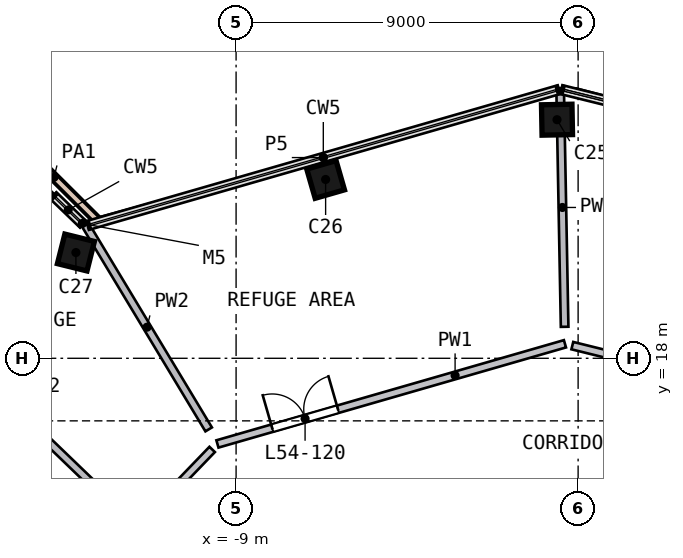
"""IFC4 building model, lengths in metres.
Left out: names, types, materials, properties, quantities, classifications, styles, units other than length and angle.
Written with IfcOpenShell. Run it as: python <this file> out.ifc"""

import sys

from ifc_helpers import new_model, si_unit, direction, frame, frame_2d, origin, origin_2d, place, context, subcontext, project, spatial, rectangle, extrude, element, fill, save


model = new_model("IFC4")
c1 = context("Model", 3, precision=1e-05, world=origin(), true_north=direction((0.0, 1.0)))
c2 = subcontext(c1, "Body", "Model", "MODEL_VIEW")
j1 = project(units=[si_unit("LENGTHUNIT", "METRE"), si_unit("PLANEANGLEUNIT", "RADIAN")], contexts=[c1])
p1 = place(None, origin())
s1 = spatial("IfcSite", under=j1, at=p1, CompositionType="ELEMENT")
p2 = place(p1, origin())
s2 = spatial("IfcBuilding", under=s1, at=p2, CompositionType="ELEMENT")
p3 = place(p2, frame((0.0, 0.0, 222.0)))
s3 = spatial("IfcBuildingStorey", under=s2, at=p3, CompositionType="ELEMENT", Elevation=222.0)
p4 = place(p3, frame((-0.458, 24.281, 0.0), z_axis=(-0.081095683, -0.002231039, 0.996703824), x_axis=(0.996522811, 0.019006948, 0.081123501)))
e1 = element("IfcColumn", 1, at=p4, inside=s3, PredefinedType="COLUMN", context=c2, shape_type="SweptSolid", body=[
    extrude(rectangle(XDim=0.8, YDim=0.8, at=origin_2d()), origin(), (0.0, 0.0, 1.0), 4.706),
])
p5 = place(p3, frame((-6.553, 22.733, 0.0), z_axis=(-0.075712705, -0.022521805, 0.996875295), x_axis=(-0.957859976, -0.276161296, -0.078988637)))
e2 = element("IfcColumn", 2, at=p5, inside=s3, PredefinedType="COLUMN", context=c2, shape_type="SweptSolid", body=[
    extrude(rectangle(XDim=0.8, YDim=0.8, at=origin_2d()), origin(), (0.0, 0.0, 1.0), 4.705),
])
p6 = place(p3, frame((-13.131, 20.836, 0.0), z_axis=(-0.069207657, -0.044460991, 0.996611018), x_axis=(0.968345326, -0.24315986, 0.056396911)))
e3 = element("IfcColumn", 3, at=p6, inside=s3, PredefinedType="COLUMN", context=c2, shape_type="SweptSolid", body=[
    extrude(rectangle(XDim=0.8, YDim=0.8, at=origin_2d()), origin(), (0.0, 0.0, 1.0), 4.706),
])
p7 = place(p3, frame((-13.846, 22.357, 0.0), z_axis=(0.0, 0.0, 1.0), x_axis=(-0.693701734, -0.720262386, 0.0)))
e4 = element("IfcWall", 4, at=p7, inside=s3, PredefinedType="SOLIDWALL", context=c2, shape_type="SweptSolid", body=[
    extrude(rectangle(XDim=1.875, YDim=0.15, at=frame_2d((0.938, 0.0))), origin(), (0.0, 0.0, 1.0), 4.69),
])
p8 = place(p3, frame((-12.638, 21.617, 0.0), z_axis=(0.0, 0.0, 1.0), x_axis=(-0.708569717, 0.705640812, 0.0)))
e5 = element("IfcWall", 5, at=p8, inside=s3, PredefinedType="PARAPET", context=c2, shape_type="SweptSolid", body=[
    extrude(rectangle(XDim=3.251, YDim=0.2, at=frame_2d((1.625, 0.0))), origin(), (0.0, 0.0, 1.0), 1.1),
])
p9 = place(p3, frame((-15.953, 9.035, 0.0), z_axis=(0.0, 0.0, 1.0), x_axis=(0.693644775, 0.72031724, 0.0)))
e6 = element("IfcWall", 6, at=p9, inside=s3, PredefinedType="SOLIDWALL", context=c2, shape_type="SweptSolid", body=[
    extrude(rectangle(XDim=9.117, YDim=0.2, at=frame_2d((4.558, 0.0))), origin(), (0.0, 0.0, 1.0), 4.69),
])
p10 = place(p9, frame((3.661, 0.0, 0.0)))
e7 = element("IfcOpeningElement", 7, at=p10, cuts=e6, PredefinedType="OPENING", context=c2, shape_type="SweptSolid", body=[
    extrude(rectangle(XDim=1.8, YDim=2.1, at=frame_2d((0.9, 1.05))), frame((0.0, 0.11, 0.0), z_axis=(0.0, -1.0, 0.0), x_axis=(1.0, 0.0, 0.0)), (0.0, 0.0, 1.0), 0.22),
])
p11 = place(p3, frame((-9.491, 15.746, 0.0), z_axis=(0.0, 0.0, 1.0), x_axis=(0.960871663, 0.276993948, 0.0)))
e8 = element("IfcWall", 8, at=p11, inside=s3, PredefinedType="SOLIDWALL", context=c2, shape_type="SweptSolid", body=[
    extrude(rectangle(XDim=9.516, YDim=0.2, at=frame_2d((4.758, 0.0))), origin(), (0.0, 0.0, 1.0), 4.69),
])
p12 = place(p11, frame((1.5, 0.0, 0.0)))
e9 = element("IfcOpeningElement", 9, at=p12, cuts=e8, PredefinedType="OPENING", context=c2, shape_type="SweptSolid", body=[
    extrude(rectangle(XDim=1.8, YDim=2.1, at=frame_2d((0.9, 1.05))), frame((0.0, 0.11, 0.0), z_axis=(0.0, -1.0, 0.0), x_axis=(1.0, 0.0, 0.0)), (0.0, 0.0, 1.0), 0.22),
])
p13 = place(p3, frame((-0.152, 18.333, 0.0), z_axis=(0.0, 0.0, 1.0), x_axis=(0.970630731, -0.240574278, 0.0)))
e10 = element("IfcWall", 10, at=p13, inside=s3, PredefinedType="SOLIDWALL", context=c2, shape_type="SweptSolid", body=[
    extrude(rectangle(XDim=9.316, YDim=0.2, at=frame_2d((4.658, 0.0))), origin(), (0.0, 0.0, 1.0), 4.69),
])
p14 = place(p13, frame((1.3, 0.0, 0.0)))
e11 = element("IfcOpeningElement", 11, at=p14, cuts=e10, PredefinedType="OPENING", context=c2, shape_type="SweptSolid", body=[
    extrude(rectangle(XDim=1.8, YDim=2.1, at=frame_2d((0.9, 1.05))), frame((0.0, 0.11, 0.0), z_axis=(0.0, -1.0, 0.0), x_axis=(1.0, 0.0, 0.0)), (0.0, 0.0, 1.0), 0.22),
])
p15 = place(p3, frame((-19.811, 21.462, 0.0), z_axis=(0.0, 0.0, 1.0), x_axis=(0.720312548, -0.693649647, 0.0)))
e12 = element("IfcWall", 12, at=p15, inside=s3, PredefinedType="SOLIDWALL", context=c2, shape_type="SweptSolid", body=[
    extrude(rectangle(XDim=11.198, YDim=0.2, at=frame_2d((5.599, 0.0))), origin(), (0.0, 0.0, 1.0), 4.69),
])
p16 = place(p15, frame((1.65, 0.0, 0.0)))
e13 = element("IfcOpeningElement", 13, at=p16, cuts=e12, PredefinedType="OPENING", context=c2, shape_type="SweptSolid", body=[
    extrude(rectangle(XDim=1.0, YDim=2.1, at=frame_2d((0.5, 1.05))), frame((0.0, 0.11, 0.0), z_axis=(0.0, -1.0, 0.0), x_axis=(1.0, 0.0, 0.0)), (0.0, 0.0, 1.0), 0.22),
])
p17 = place(p3, frame((-12.965, 21.509, 0.0), z_axis=(0.0, 0.0, 1.0), x_axis=(0.516232154, -0.856448693, 0.0)))
e14 = element("IfcWall", 14, at=p17, inside=s3, PredefinedType="SOLIDWALL", context=c2, shape_type="SweptSolid", body=[
    extrude(rectangle(XDim=6.282, YDim=0.2, at=frame_2d((3.141, 0.0))), origin(), (0.0, 0.0, 1.0), 4.69),
])
p18 = place(p3, frame((-0.355, 18.829, 0.0), z_axis=(0.0, 0.0, 1.0), x_axis=(-0.018848441, 0.999822352, 0.0)))
e15 = element("IfcWall", 15, at=p18, inside=s3, PredefinedType="SOLIDWALL", context=c2, shape_type="SweptSolid", body=[
    extrude(rectangle(XDim=6.282, YDim=0.2, at=frame_2d((3.141, 0.0))), origin(), (0.0, 0.0, 1.0), 4.69),
])
p19 = place(p12, origin())
e16 = element("IfcDoor", 16, at=p19, inside=s3, OperationType="DOUBLE_DOOR_SINGLE_SWING", PredefinedType="DOOR", context=c2, shape_type="SweptSolid", body=[
    extrude(rectangle(XDim=1.8, YDim=2.1, at=frame_2d((0.9, 1.05))), frame((0.0, 0.025, 0.0), z_axis=(0.0, -1.0, 0.0), x_axis=(1.0, 0.0, 0.0)), (0.0, 0.0, 1.0), 0.05),
])
fill(e9, e16)
save(model, sys.argv[1])
